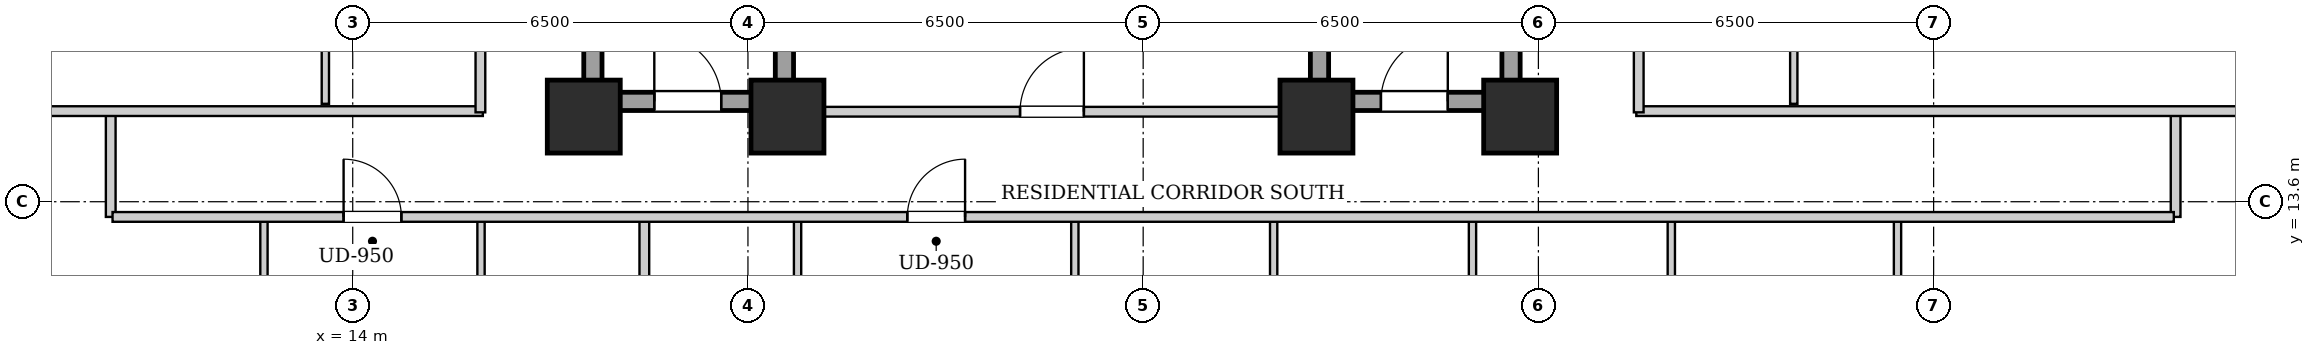
"""IFC4 building model, lengths in metres.
Left out: names, types, materials, properties, quantities, classifications, styles, units other than length and angle.
Written with IfcOpenShell. Run it as: python <this file> out.ifc"""

import sys

from ifc_helpers import new_model, si_unit, direction, frame, frame_2d, origin, origin_2d, place, context, subcontext, project, spatial, rectangle, extrude, element, fill, save


model = new_model("IFC4")
c1 = context("Model", 3, precision=1e-05, world=origin(), true_north=direction((0.0, 1.0)))
c2 = subcontext(c1, "Body", "Model", "MODEL_VIEW")
j1 = project(units=[si_unit("LENGTHUNIT", "METRE"), si_unit("PLANEANGLEUNIT", "RADIAN")], contexts=[c1])
p1 = place(None, origin())
s1 = spatial("IfcSite", under=j1, at=p1, CompositionType="ELEMENT")
p2 = place(p1, origin())
s2 = spatial("IfcBuilding", under=s1, at=p2, CompositionType="ELEMENT")
p3 = place(p2, frame((0.0, 0.0, 64.2)))
s3 = spatial("IfcBuildingStorey", under=s2, at=p3, CompositionType="ELEMENT", Elevation=64.2)
for number, where, z_axis, x_axis in (
    (1, (17.8, 15.0, 0.0), (0.0, 0.0, 1.0), (1.0, 0.0, 0.0)),
    (2, (21.15, 15.0, 0.0), (0.0, 0.0, 1.0), (1.0, 0.0, 0.0)),
    (3, (29.85, 15.0, 0.0), (0.0, 0.0, 1.0), (1.0, 0.0, 0.0)),
    (4, (33.2, 15.0, 0.0), (0.0, 0.0, 1.0), (1.0, 0.0, 0.0)),
):
    element("IfcColumn", number, at=place(p3, frame(where, z_axis=z_axis, x_axis=x_axis)), inside=s3, PredefinedType="COLUMN", context=c2, shape_type="SweptSolid", body=[
        extrude(rectangle(XDim=1.2, YDim=1.2, at=origin_2d()), origin(), (0.0, 0.0, 1.0), 3.2),
    ])
for number, where, z_axis, x_axis in (
    (5, (17.95, 15.1, 0.0), (0.0, 0.0, 1.0), (0.0, 1.0, 0.0)),
    (6, (21.1, 15.1, 0.0), (0.0, 0.0, 1.0), (0.0, 1.0, 0.0)),
):
    element("IfcWall", number, at=place(p3, frame(where, z_axis=z_axis, x_axis=x_axis)), inside=s3, PredefinedType="SHEAR", context=c2, shape_type="SweptSolid", body=[
        extrude(rectangle(XDim=9.0, YDim=0.3, at=frame_2d((4.5, 0.0))), origin(), (0.0, 0.0, 1.0), 2.94),
    ])
p4 = place(p3, frame((18.1, 15.25, 0.0), z_axis=(0.0, 0.0, 1.0), x_axis=(1.0, 0.0, 0.0)))
e7 = element("IfcWall", 7, at=p4, inside=s3, PredefinedType="SHEAR", context=c2, shape_type="SweptSolid", body=[
    extrude(rectangle(XDim=2.85, YDim=0.3, at=frame_2d((1.425, 0.0))), origin(), (0.0, 0.0, 1.0), 2.94),
])
p5 = place(p4, frame((0.86, 0.0, 0.0)))
e8 = element("IfcOpeningElement", 8, at=p5, cuts=e7, PredefinedType="OPENING", context=c2, shape_type="SweptSolid", body=[
    extrude(rectangle(XDim=1.1, YDim=2.05, at=frame_2d((0.55, 1.025))), frame((0.0, 0.16, 0.0), z_axis=(0.0, -1.0, 0.0), x_axis=(1.0, 0.0, 0.0)), (0.0, 0.0, 1.0), 0.32),
])
for number, where, z_axis, x_axis in (
    (9, (29.9, 15.1, 0.0), (0.0, 0.0, 1.0), (0.0, 1.0, 0.0)),
    (10, (33.05, 15.1, 0.0), (0.0, 0.0, 1.0), (0.0, 1.0, 0.0)),
):
    element("IfcWall", number, at=place(p3, frame(where, z_axis=z_axis, x_axis=x_axis)), inside=s3, PredefinedType="SHEAR", context=c2, shape_type="SweptSolid", body=[
        extrude(rectangle(XDim=9.0, YDim=0.3, at=frame_2d((4.5, 0.0))), origin(), (0.0, 0.0, 1.0), 2.94),
    ])
p6 = place(p3, frame((30.05, 15.25, 0.0), z_axis=(0.0, 0.0, 1.0), x_axis=(1.0, 0.0, 0.0)))
e11 = element("IfcWall", 11, at=p6, inside=s3, PredefinedType="SHEAR", context=c2, shape_type="SweptSolid", body=[
    extrude(rectangle(XDim=2.85, YDim=0.3, at=frame_2d((1.425, 0.0))), origin(), (0.0, 0.0, 1.0), 2.94),
])
p7 = place(p6, frame((0.86, 0.0, 0.0)))
e12 = element("IfcOpeningElement", 12, at=p7, cuts=e11, PredefinedType="OPENING", context=c2, shape_type="SweptSolid", body=[
    extrude(rectangle(XDim=1.1, YDim=2.05, at=frame_2d((0.55, 1.025))), frame((0.0, 0.16, 0.0), z_axis=(0.0, -1.0, 0.0), x_axis=(1.0, 0.0, 0.0)), (0.0, 0.0, 1.0), 0.32),
])
p8 = place(p3, frame((21.25, 15.08, 0.0), z_axis=(0.0, 0.0, 1.0), x_axis=(1.0, 0.0, 0.0)))
e13 = element("IfcWall", 13, at=p8, inside=s3, PredefinedType="PARTITIONING", context=c2, shape_type="SweptSolid", body=[
    extrude(rectangle(XDim=8.5, YDim=0.16, at=frame_2d((4.25, 0.0))), origin(), (0.0, 0.0, 1.0), 2.232),
])
p9 = place(p8, frame((3.725, 0.0, 0.0)))
e14 = element("IfcOpeningElement", 14, at=p9, cuts=e13, PredefinedType="OPENING", context=c2, shape_type="SweptSolid", body=[
    extrude(rectangle(XDim=1.05, YDim=2.05, at=frame_2d((0.525, 1.025))), frame((0.0, 0.09, 0.0), z_axis=(0.0, -1.0, 0.0), x_axis=(1.0, 0.0, 0.0)), (0.0, 0.0, 1.0), 0.18),
])
for number, where, z_axis, x_axis in (
    (15, (10.02, 13.35, 0.0), (0.0, 0.0, 1.0), (0.0, 1.0, 0.0)),
    (16, (43.98, 13.35, 0.0), (0.0, 0.0, 1.0), (0.0, 1.0, 0.0)),
):
    element("IfcWall", number, at=place(p3, frame(where, z_axis=z_axis, x_axis=x_axis)), inside=s3, PredefinedType="PARTITIONING", context=c2, shape_type="SweptSolid", body=[
        extrude(rectangle(XDim=1.74, YDim=0.16, at=frame_2d((0.87, 0.0))), origin(), (0.0, 0.0, 1.0), 2.94),
    ])
p10 = place(p3, frame((7.78, 15.09, 0.0), z_axis=(0.0, 0.0, 1.0), x_axis=(1.0, 0.0, 0.0)))
e17 = element("IfcWall", 17, at=p10, inside=s3, PredefinedType="PARTITIONING", context=c2, shape_type="SweptSolid", body=[
    extrude(rectangle(XDim=8.36, YDim=0.16, at=frame_2d((4.18, 0.0))), origin(), (0.0, 0.0, 1.0), 2.232),
])
p11 = place(p3, frame((35.11, 15.09, 0.0), z_axis=(0.0, 0.0, 1.0), x_axis=(1.0, 0.0, 0.0)))
e18 = element("IfcWall", 18, at=p11, inside=s3, PredefinedType="PARTITIONING", context=c2, shape_type="SweptSolid", body=[
    extrude(rectangle(XDim=11.11, YDim=0.16, at=frame_2d((5.555, 0.0))), origin(), (0.0, 0.0, 1.0), 2.232),
])
p12 = place(p3, frame((12.54, 10.46, 0.0), z_axis=(0.0, 0.0, 1.0), x_axis=(0.0, 1.0, 0.0)))
e19 = element("IfcWall", 19, at=p12, inside=s3, PredefinedType="PARTITIONING", context=c2, shape_type="SweptSolid", body=[
    extrude(rectangle(XDim=2.85, YDim=0.12, at=frame_2d((1.425, 0.0))), origin(), (0.0, 0.0, 1.0), 2.94),
])
p13 = place(p12, frame((0.995, 0.0, 0.0)))
e20 = element("IfcOpeningElement", 20, at=p13, cuts=e19, PredefinedType="OPENING", context=c2, shape_type="SweptSolid", body=[
    extrude(rectangle(XDim=0.86, YDim=2.05, at=frame_2d((0.43, 1.025))), frame((0.0, 0.07, 0.0), z_axis=(0.0, -1.0, 0.0), x_axis=(1.0, 0.0, 0.0)), (0.0, 0.0, 1.0), 0.14),
])
p14 = place(p3, frame((16.11, 10.46, 0.0), z_axis=(0.0, 0.0, 1.0), x_axis=(0.0, 1.0, 0.0)))
e21 = element("IfcWall", 21, at=p14, inside=s3, PredefinedType="PARTITIONING", context=c2, shape_type="SweptSolid", body=[
    extrude(rectangle(XDim=2.85, YDim=0.12, at=frame_2d((1.425, 0.0))), origin(), (0.0, 0.0, 1.0), 2.94),
])
p15 = place(p14, frame((0.975, 0.0, 0.0)))
e22 = element("IfcOpeningElement", 22, at=p15, cuts=e21, PredefinedType="OPENING", context=c2, shape_type="SweptSolid", body=[
    extrude(rectangle(XDim=0.9, YDim=2.05, at=frame_2d((0.45, 1.025))), frame((0.0, 0.07, 0.0), z_axis=(0.0, -1.0, 0.0), x_axis=(1.0, 0.0, 0.0)), (0.0, 0.0, 1.0), 0.14),
])
p16 = place(p3, frame((18.796, 0.28, 0.0), z_axis=(0.0, 0.0, 1.0), x_axis=(0.0, 1.0, 0.0)))
e23 = element("IfcWall", 23, at=p16, inside=s3, PredefinedType="PARTITIONING", context=c2, shape_type="SweptSolid", body=[
    extrude(rectangle(XDim=13.03, YDim=0.16, at=frame_2d((6.515, 0.0))), origin(), (0.0, 0.0, 1.0), 2.94),
])
p17 = place(p3, frame((21.316, 10.46, 0.0), z_axis=(0.0, 0.0, 1.0), x_axis=(0.0, 1.0, 0.0)))
e24 = element("IfcWall", 24, at=p17, inside=s3, PredefinedType="PARTITIONING", context=c2, shape_type="SweptSolid", body=[
    extrude(rectangle(XDim=2.85, YDim=0.12, at=frame_2d((1.425, 0.0))), origin(), (0.0, 0.0, 1.0), 2.94),
])
p18 = place(p17, frame((0.995, 0.0, 0.0)))
e25 = element("IfcOpeningElement", 25, at=p18, cuts=e24, PredefinedType="OPENING", context=c2, shape_type="SweptSolid", body=[
    extrude(rectangle(XDim=0.86, YDim=2.05, at=frame_2d((0.43, 1.025))), frame((0.0, 0.07, 0.0), z_axis=(0.0, -1.0, 0.0), x_axis=(1.0, 0.0, 0.0)), (0.0, 0.0, 1.0), 0.14),
])
p19 = place(p3, frame((25.876, 10.46, 0.0), z_axis=(0.0, 0.0, 1.0), x_axis=(0.0, 1.0, 0.0)))
e26 = element("IfcWall", 26, at=p19, inside=s3, PredefinedType="PARTITIONING", context=c2, shape_type="SweptSolid", body=[
    extrude(rectangle(XDim=2.85, YDim=0.12, at=frame_2d((1.425, 0.0))), origin(), (0.0, 0.0, 1.0), 2.94),
])
p20 = place(p19, frame((0.975, 0.0, 0.0)))
e27 = element("IfcOpeningElement", 27, at=p20, cuts=e26, PredefinedType="OPENING", context=c2, shape_type="SweptSolid", body=[
    extrude(rectangle(XDim=0.9, YDim=2.05, at=frame_2d((0.45, 1.025))), frame((0.0, 0.07, 0.0), z_axis=(0.0, -1.0, 0.0), x_axis=(1.0, 0.0, 0.0)), (0.0, 0.0, 1.0), 0.14),
])
p21 = place(p3, frame((29.146, 10.46, 0.0), z_axis=(0.0, 0.0, 1.0), x_axis=(0.0, 1.0, 0.0)))
e28 = element("IfcWall", 28, at=p21, inside=s3, PredefinedType="PARTITIONING", context=c2, shape_type="SweptSolid", body=[
    extrude(rectangle(XDim=2.85, YDim=0.12, at=frame_2d((1.425, 0.0))), origin(), (0.0, 0.0, 1.0), 2.94),
])
p22 = place(p21, frame((0.975, 0.0, 0.0)))
e29 = element("IfcOpeningElement", 29, at=p22, cuts=e28, PredefinedType="OPENING", context=c2, shape_type="SweptSolid", body=[
    extrude(rectangle(XDim=0.9, YDim=2.05, at=frame_2d((0.45, 1.025))), frame((0.0, 0.07, 0.0), z_axis=(0.0, -1.0, 0.0), x_axis=(1.0, 0.0, 0.0)), (0.0, 0.0, 1.0), 0.14),
])
p23 = place(p3, frame((32.416, 10.46, 0.0), z_axis=(0.0, 0.0, 1.0), x_axis=(0.0, 1.0, 0.0)))
e30 = element("IfcWall", 30, at=p23, inside=s3, PredefinedType="PARTITIONING", context=c2, shape_type="SweptSolid", body=[
    extrude(rectangle(XDim=2.85, YDim=0.12, at=frame_2d((1.425, 0.0))), origin(), (0.0, 0.0, 1.0), 2.94),
])
p24 = place(p23, frame((0.975, 0.0, 0.0)))
e31 = element("IfcOpeningElement", 31, at=p24, cuts=e30, PredefinedType="OPENING", context=c2, shape_type="SweptSolid", body=[
    extrude(rectangle(XDim=0.9, YDim=2.05, at=frame_2d((0.45, 1.025))), frame((0.0, 0.07, 0.0), z_axis=(0.0, -1.0, 0.0), x_axis=(1.0, 0.0, 0.0)), (0.0, 0.0, 1.0), 0.14),
])
p25 = place(p3, frame((35.686, 10.46, 0.0), z_axis=(0.0, 0.0, 1.0), x_axis=(0.0, 1.0, 0.0)))
e32 = element("IfcWall", 32, at=p25, inside=s3, PredefinedType="PARTITIONING", context=c2, shape_type="SweptSolid", body=[
    extrude(rectangle(XDim=2.85, YDim=0.12, at=frame_2d((1.425, 0.0))), origin(), (0.0, 0.0, 1.0), 2.94),
])
p26 = place(p25, frame((0.975, 0.0, 0.0)))
e33 = element("IfcOpeningElement", 33, at=p26, cuts=e32, PredefinedType="OPENING", context=c2, shape_type="SweptSolid", body=[
    extrude(rectangle(XDim=0.9, YDim=2.05, at=frame_2d((0.45, 1.025))), frame((0.0, 0.07, 0.0), z_axis=(0.0, -1.0, 0.0), x_axis=(1.0, 0.0, 0.0)), (0.0, 0.0, 1.0), 0.14),
])
p27 = place(p3, frame((39.406, 10.46, 0.0), z_axis=(0.0, 0.0, 1.0), x_axis=(0.0, 1.0, 0.0)))
e34 = element("IfcWall", 34, at=p27, inside=s3, PredefinedType="PARTITIONING", context=c2, shape_type="SweptSolid", body=[
    extrude(rectangle(XDim=2.85, YDim=0.12, at=frame_2d((1.425, 0.0))), origin(), (0.0, 0.0, 1.0), 2.94),
])
p28 = place(p27, frame((0.975, 0.0, 0.0)))
e35 = element("IfcOpeningElement", 35, at=p28, cuts=e34, PredefinedType="OPENING", context=c2, shape_type="SweptSolid", body=[
    extrude(rectangle(XDim=0.9, YDim=2.05, at=frame_2d((0.45, 1.025))), frame((0.0, 0.07, 0.0), z_axis=(0.0, -1.0, 0.0), x_axis=(1.0, 0.0, 0.0)), (0.0, 0.0, 1.0), 0.14),
])
p29 = place(p3, frame((13.55, 15.21, 0.0), z_axis=(0.0, 0.0, 1.0), x_axis=(0.0, 1.0, 0.0)))
e36 = element("IfcWall", 36, at=p29, inside=s3, PredefinedType="PARTITIONING", context=c2, shape_type="SweptSolid", body=[
    extrude(rectangle(XDim=2.159, YDim=0.12, at=frame_2d((1.08, 0.0))), origin(), (0.0, 0.0, 1.0), 2.94),
])
p30 = place(p3, frame((37.7, 15.21, 0.0), z_axis=(0.0, 0.0, 1.0), x_axis=(0.0, 1.0, 0.0)))
e37 = element("IfcWall", 37, at=p30, inside=s3, PredefinedType="PARTITIONING", context=c2, shape_type="SweptSolid", body=[
    extrude(rectangle(XDim=2.3, YDim=0.12, at=frame_2d((1.15, 0.0))), origin(), (0.0, 0.0, 1.0), 2.94),
])
p31 = place(p3, frame((10.05, 13.35, 0.0), z_axis=(0.0, 0.0, 1.0), x_axis=(1.0, 0.0, 0.0)))
e38 = element("IfcWall", 38, at=p31, inside=s3, PredefinedType="PARTITIONING", context=c2, shape_type="SweptSolid", body=[
    extrude(rectangle(XDim=33.9, YDim=0.16, at=frame_2d((16.95, 0.0))), origin(), (0.0, 0.0, 1.0), 2.94),
])
p32 = place(p31, frame((3.8, 0.0, 0.0)))
e39 = element("IfcOpeningElement", 39, at=p32, cuts=e38, PredefinedType="OPENING", context=c2, shape_type="SweptSolid", body=[
    extrude(rectangle(XDim=0.95, YDim=2.1, at=frame_2d((0.475, 1.05))), frame((0.0, 0.09, 0.0), z_axis=(0.0, -1.0, 0.0), x_axis=(1.0, 0.0, 0.0)), (0.0, 0.0, 1.0), 0.18),
])
p33 = place(p31, frame((13.071, 0.0, 0.0)))
e40 = element("IfcOpeningElement", 40, at=p33, cuts=e38, PredefinedType="OPENING", context=c2, shape_type="SweptSolid", body=[
    extrude(rectangle(XDim=0.95, YDim=2.1, at=frame_2d((0.475, 1.05))), frame((0.0, 0.09, 0.0), z_axis=(0.0, -1.0, 0.0), x_axis=(1.0, 0.0, 0.0)), (0.0, 0.0, 1.0), 0.18),
])
p34 = place(p3, frame((16.1, 15.07, 0.0), z_axis=(0.0, 0.0, 1.0), x_axis=(0.0, 1.0, 0.0)))
e41 = element("IfcWall", 41, at=p34, inside=s3, PredefinedType="PARTITIONING", context=c2, shape_type="SweptSolid", body=[
    extrude(rectangle(XDim=13.93, YDim=0.16, at=frame_2d((6.965, 0.0))), origin(), (0.0, 0.0, 1.0), 2.94),
])
p35 = place(p34, frame((4.661, 0.0, 0.0)))
e42 = element("IfcOpeningElement", 42, at=p35, cuts=e41, PredefinedType="OPENING", context=c2, shape_type="SweptSolid", body=[
    extrude(rectangle(XDim=0.95, YDim=2.1, at=frame_2d((0.475, 1.05))), frame((0.0, 0.09, 0.0), z_axis=(0.0, -1.0, 0.0), x_axis=(1.0, 0.0, 0.0)), (0.0, 0.0, 1.0), 0.18),
])
p36 = place(p34, frame((11.411, 0.0, 0.0)))
e43 = element("IfcOpeningElement", 43, at=p36, cuts=e41, PredefinedType="OPENING", context=c2, shape_type="SweptSolid", body=[
    extrude(rectangle(XDim=0.95, YDim=2.1, at=frame_2d((0.475, 1.05))), frame((0.0, 0.09, 0.0), z_axis=(0.0, -1.0, 0.0), x_axis=(1.0, 0.0, 0.0)), (0.0, 0.0, 1.0), 0.18),
])
p37 = place(p3, frame((35.15, 15.07, 0.0), z_axis=(0.0, 0.0, 1.0), x_axis=(0.0, 1.0, 0.0)))
e44 = element("IfcWall", 44, at=p37, inside=s3, PredefinedType="PARTITIONING", context=c2, shape_type="SweptSolid", body=[
    extrude(rectangle(XDim=13.93, YDim=0.16, at=frame_2d((6.965, 0.0))), origin(), (0.0, 0.0, 1.0), 2.94),
])
p38 = place(p37, frame((4.385, 0.0, 0.0)))
e45 = element("IfcOpeningElement", 45, at=p38, cuts=e44, PredefinedType="OPENING", context=c2, shape_type="SweptSolid", body=[
    extrude(rectangle(XDim=0.95, YDim=2.1, at=frame_2d((0.475, 1.05))), frame((0.0, 0.09, 0.0), z_axis=(0.0, -1.0, 0.0), x_axis=(1.0, 0.0, 0.0)), (0.0, 0.0, 1.0), 0.18),
])
p39 = place(p5, origin())
e46 = element("IfcDoor", 46, at=p39, inside=s3, OperationType="SINGLE_SWING_LEFT", PredefinedType="DOOR", context=c2, shape_type="SweptSolid", body=[
    extrude(rectangle(XDim=1.1, YDim=2.05, at=frame_2d((0.55, 1.025))), frame((0.0, 0.025, 0.0), z_axis=(0.0, -1.0, 0.0), x_axis=(1.0, 0.0, 0.0)), (0.0, 0.0, 1.0), 0.05),
])
fill(e8, e46)
p40 = place(p7, origin())
e47 = element("IfcDoor", 47, at=p40, inside=s3, OperationType="SINGLE_SWING_RIGHT", PredefinedType="DOOR", context=c2, shape_type="SweptSolid", body=[
    extrude(rectangle(XDim=1.1, YDim=2.05, at=frame_2d((0.55, 1.025))), frame((0.0, 0.025, 0.0), z_axis=(0.0, -1.0, 0.0), x_axis=(1.0, 0.0, 0.0)), (0.0, 0.0, 1.0), 0.05),
])
fill(e12, e47)
p41 = place(p9, origin())
e48 = element("IfcDoor", 48, at=p41, inside=s3, OperationType="SINGLE_SWING_RIGHT", PredefinedType="DOOR", context=c2, shape_type="SweptSolid", body=[
    extrude(rectangle(XDim=1.05, YDim=2.05, at=frame_2d((0.525, 1.025))), frame((0.0, 0.025, 0.0), z_axis=(0.0, -1.0, 0.0), x_axis=(1.0, 0.0, 0.0)), (0.0, 0.0, 1.0), 0.05),
])
fill(e14, e48)
p42 = place(p32, origin())
e49 = element("IfcDoor", 49, at=p42, inside=s3, OperationType="SINGLE_SWING_LEFT", PredefinedType="DOOR", context=c2, shape_type="SweptSolid", body=[
    extrude(rectangle(XDim=0.95, YDim=2.1, at=frame_2d((0.475, 1.05))), frame((0.0, 0.025, 0.0), z_axis=(0.0, -1.0, 0.0), x_axis=(1.0, 0.0, 0.0)), (0.0, 0.0, 1.0), 0.05),
])
fill(e39, e49)
p43 = place(p33, origin())
e50 = element("IfcDoor", 50, at=p43, inside=s3, OperationType="SINGLE_SWING_RIGHT", PredefinedType="DOOR", context=c2, shape_type="SweptSolid", body=[
    extrude(rectangle(XDim=0.95, YDim=2.1, at=frame_2d((0.475, 1.05))), frame((0.0, 0.025, 0.0), z_axis=(0.0, -1.0, 0.0), x_axis=(1.0, 0.0, 0.0)), (0.0, 0.0, 1.0), 0.05),
])
fill(e40, e50)
save(model, sys.argv[1])
